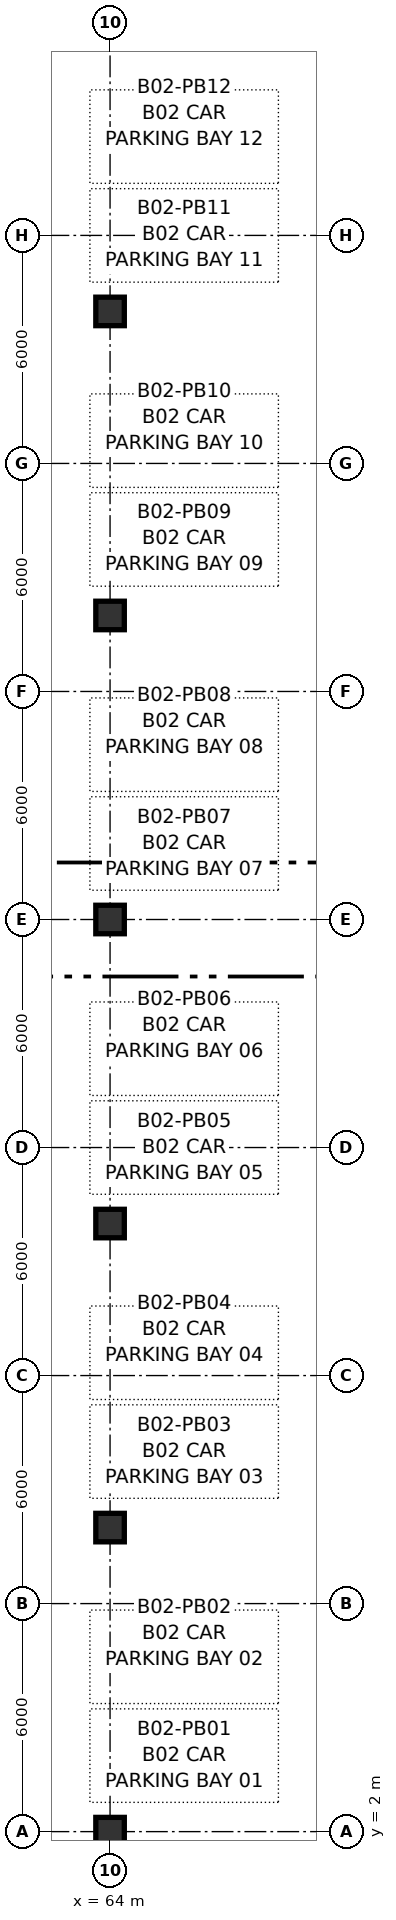
"""IFC4 building model, lengths in metres.
Left out: names, types, materials, properties, quantities, classifications, styles, units other than length and angle.
Written with IfcOpenShell. Run it as: python <this file> out.ifc"""

import sys

from ifc_helpers import new_model, si_unit, direction, frame, origin, origin_2d, place, context, subcontext, project, spatial, rectangle, extrude, source, transform, mapped, element, save


model = new_model("IFC4")
c1 = context("Model", 3, precision=1e-05, world=origin(), true_north=direction((0.0, 1.0)))
c2 = subcontext(c1, "Body", "Model", "MODEL_VIEW")
j1 = project(units=[si_unit("LENGTHUNIT", "METRE"), si_unit("PLANEANGLEUNIT", "RADIAN")], contexts=[c1])
p1 = place(None, origin())
s1 = spatial("IfcSite", under=j1, at=p1, CompositionType="ELEMENT")
p2 = place(p1, origin())
s2 = spatial("IfcBuilding", under=s1, at=p2, CompositionType="ELEMENT")
p3 = place(p2, frame((0.0, 0.0, -8.7)))
s3 = spatial("IfcBuildingStorey", under=s2, at=p3, CompositionType="ELEMENT", Elevation=-8.7)
m1 = source(origin(), c2, "Body", "SweptSolid", [
    extrude(rectangle(XDim=0.75, YDim=0.75, at=origin_2d()), origin(), (0.0, 0.0, 1.0), 4.2),
])
for number, where, z_axis, x_axis in (
    (1, (64.0, 2.0, 0.0), (0.0, 0.0, 1.0), (1.0, 0.0, 0.0)),
    (2, (64.0, 10.0, 0.0), (0.0, 0.0, 1.0), (1.0, 0.0, 0.0)),
    (3, (64.0, 18.0, 0.0), (0.0, 0.0, 1.0), (1.0, 0.0, 0.0)),
    (4, (64.0, 26.0, 0.0), (0.0, 0.0, 1.0), (1.0, 0.0, 0.0)),
    (5, (64.0, 34.0, 0.0), (0.0, 0.0, 1.0), (1.0, 0.0, 0.0)),
    (6, (64.0, 42.0, 0.0), (0.0, 0.0, 1.0), (1.0, 0.0, 0.0)),
):
    element("IfcColumn", number, at=place(p3, frame(where, z_axis=z_axis, x_axis=x_axis)), inside=s3, PredefinedType="COLUMN", context=c2, shape_type="MappedRepresentation", body=[
        mapped(m1, transform((0.0, 0.0, 0.0), x_axis=(1.0, 0.0, 0.0), y_axis=(0.0, 1.0, 0.0), z_axis=(0.0, 0.0, 1.0), scale=1.0)),
    ])
save(model, sys.argv[1])
